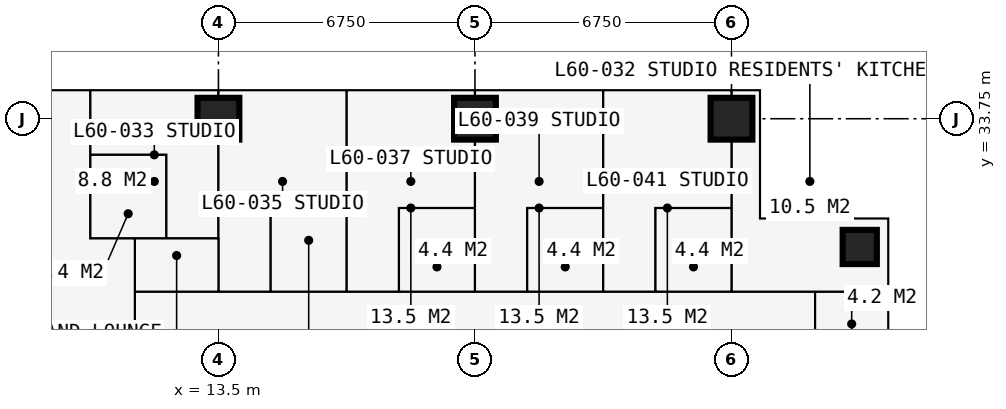
"""IFC4 building model, lengths in metres.
Left out: names, types, materials, properties, quantities, classifications, styles, units other than length and angle.
Written with IfcOpenShell. Run it as: python <this file> out.ifc"""

import sys

from ifc_helpers import new_model, si_unit, direction, frame, frame_2d, origin, origin_2d, place, context, subcontext, project, spatial, rectangle, extrude, element, fill, save


model = new_model("IFC4")
c1 = context("Model", 3, precision=1e-05, world=origin(), true_north=direction((0.0, 1.0)))
c2 = subcontext(c1, "Body", "Model", "MODEL_VIEW")
j1 = project(units=[si_unit("LENGTHUNIT", "METRE"), si_unit("PLANEANGLEUNIT", "RADIAN")], contexts=[c1])
p1 = place(None, origin())
s1 = spatial("IfcSite", under=j1, at=p1, CompositionType="ELEMENT")
p2 = place(p1, origin())
s2 = spatial("IfcBuilding", under=s1, at=p2, CompositionType="ELEMENT")
p3 = place(p2, frame((0.0, 0.0, 222.3)))
s3 = spatial("IfcBuildingStorey", under=s2, at=p3, CompositionType="ELEMENT", Elevation=222.3)
for number, where, z_axis, x_axis in (
    (1, (13.5, 33.75, 0.0), (0.0, 0.0, 1.0), (1.0, 0.0, 0.0)),
    (2, (20.25, 33.75, 0.0), (0.0, 0.0, 1.0), (1.0, 0.0, 0.0)),
    (3, (27.0, 33.75, 0.0), (0.0, 0.0, 1.0), (1.0, 0.0, 0.0)),
):
    element("IfcColumn", number, at=place(p3, frame(where, z_axis=z_axis, x_axis=x_axis)), inside=s3, PredefinedType="COLUMN", context=c2, shape_type="SweptSolid", body=[
        extrude(rectangle(XDim=1.1, YDim=1.1, at=origin_2d()), origin(), (0.0, 0.0, 1.0), 3.6),
    ])
p4 = place(p3, frame((30.375, 30.375, 0.0), z_axis=(0.0, 0.0, 1.0), x_axis=(1.0, 0.0, 0.0)))
e4 = element("IfcColumn", 4, at=p4, inside=s3, PredefinedType="COLUMN", context=c2, shape_type="SweptSolid", body=[
    extrude(rectangle(XDim=0.9, YDim=0.9, at=origin_2d()), origin(), (0.0, 0.0, 1.0), 3.6),
])
p5 = place(p3, frame((31.125, 27.75, 0.0), z_axis=(0.0, 0.0, 1.0), x_axis=(0.0, 1.0, 0.0)))
e5 = element("IfcWall", 5, at=p5, inside=s3, PredefinedType="SOLIDWALL", context=c2, shape_type="SweptSolid", body=[
    extrude(rectangle(XDim=3.375, YDim=0.3, at=frame_2d((1.688, 0.0))), origin(), (0.0, 0.0, 1.0), 3.375),
])
p6 = place(p5, frame((1.663, 0.0, 0.9)))
e6 = element("IfcOpeningElement", 6, at=p6, cuts=e5, PredefinedType="OPENING", context=c2, shape_type="SweptSolid", body=[
    extrude(rectangle(XDim=1.5, YDim=1.8, at=frame_2d((0.75, 0.9))), frame((0.0, 0.16, 0.0), z_axis=(0.0, -1.0, 0.0), x_axis=(1.0, 0.0, 0.0)), (0.0, 0.0, 1.0), 0.32),
])
p7 = place(p3, frame((31.125, 31.125, 0.0), z_axis=(0.0, 0.0, 1.0), x_axis=(-1.0, 0.0, 0.0)))
e7 = element("IfcWall", 7, at=p7, inside=s3, PredefinedType="SOLIDWALL", context=c2, shape_type="SweptSolid", body=[
    extrude(rectangle(XDim=3.375, YDim=0.3, at=frame_2d((1.688, 0.0))), origin(), (0.0, 0.0, 1.0), 3.375),
])
p8 = place(p7, frame((0.788, 0.0, 0.6)))
e8 = element("IfcOpeningElement", 8, at=p8, cuts=e7, PredefinedType="OPENING", context=c2, shape_type="SweptSolid", body=[
    extrude(rectangle(XDim=1.8, YDim=2.1, at=frame_2d((0.9, 1.05))), frame((0.0, 0.16, 0.0), z_axis=(0.0, -1.0, 0.0), x_axis=(1.0, 0.0, 0.0)), (0.0, 0.0, 1.0), 0.32),
])
p9 = place(p3, frame((27.75, 31.125, 0.0), z_axis=(0.0, 0.0, 1.0), x_axis=(0.0, 1.0, 0.0)))
e9 = element("IfcWall", 9, at=p9, inside=s3, PredefinedType="SOLIDWALL", context=c2, shape_type="SweptSolid", body=[
    extrude(rectangle(XDim=3.375, YDim=0.3, at=frame_2d((1.688, 0.0))), origin(), (0.0, 0.0, 1.0), 3.375),
])
p10 = place(p9, frame((0.788, 0.0, 0.6)))
e10 = element("IfcOpeningElement", 10, at=p10, cuts=e9, PredefinedType="OPENING", context=c2, shape_type="SweptSolid", body=[
    extrude(rectangle(XDim=1.8, YDim=2.1, at=frame_2d((0.9, 1.05))), frame((0.0, 0.16, 0.0), z_axis=(0.0, -1.0, 0.0), x_axis=(1.0, 0.0, 0.0)), (0.0, 0.0, 1.0), 0.32),
])
p11 = place(p3, frame((10.125, 30.6, 0.0), z_axis=(0.0, 0.0, 1.0), x_axis=(0.0, 1.0, 0.0)))
e11 = element("IfcWall", 11, at=p11, inside=s3, PredefinedType="PARTITIONING", context=c2, shape_type="SweptSolid", body=[
    extrude(rectangle(XDim=3.884, YDim=0.1, at=frame_2d((1.942, 0.0))), origin(), (0.0, 0.0, 1.0), 3.375),
])
p12 = place(p3, frame((10.125, 30.6, 0.0), z_axis=(0.0, 0.0, 1.0), x_axis=(1.0, 0.0, 0.0)))
e12 = element("IfcWall", 12, at=p12, inside=s3, PredefinedType="PARTITIONING", context=c2, shape_type="SweptSolid", body=[
    extrude(rectangle(XDim=3.375, YDim=0.1, at=frame_2d((1.688, 0.0))), origin(), (0.0, 0.0, 1.0), 3.375),
])
p13 = place(p12, frame((2.2, 0.0, 0.0)))
e13 = element("IfcOpeningElement", 13, at=p13, cuts=e12, PredefinedType="OPENING", context=c2, shape_type="SweptSolid", body=[
    extrude(rectangle(XDim=0.95, YDim=2.2, at=frame_2d((0.475, 1.1))), frame((0.0, 0.06, 0.0), z_axis=(0.0, -1.0, 0.0), x_axis=(1.0, 0.0, 0.0)), (0.0, 0.0, 1.0), 0.12),
])
p14 = place(p3, frame((10.125, 32.8, 0.0), z_axis=(0.0, 0.0, 1.0), x_axis=(1.0, 0.0, 0.0)))
e14 = element("IfcWall", 14, at=p14, inside=s3, PredefinedType="PARTITIONING", context=c2, shape_type="SweptSolid", body=[
    extrude(rectangle(XDim=2.0, YDim=0.1, at=frame_2d((1.0, 0.0))), origin(), (0.0, 0.0, 1.0), 3.375),
])
p15 = place(p3, frame((11.3, 11.3, 0.0), z_axis=(0.0, 0.0, 1.0), x_axis=(0.0, 1.0, 0.0)))
e15 = element("IfcWall", 15, at=p15, inside=s3, PredefinedType="PARTITIONING", context=c2, shape_type="SweptSolid", body=[
    extrude(rectangle(XDim=19.3, YDim=0.15, at=frame_2d((9.65, 0.0))), origin(), (0.0, 0.0, 1.0), 3.375),
])
p16 = place(p15, frame((18.1, 0.0, 0.0)))
e16 = element("IfcOpeningElement", 16, at=p16, cuts=e15, PredefinedType="OPENING", context=c2, shape_type="SweptSolid", body=[
    extrude(rectangle(XDim=1.0, YDim=2.2, at=frame_2d((0.5, 1.1))), frame((0.0, 0.085, 0.0), z_axis=(0.0, -1.0, 0.0), x_axis=(1.0, 0.0, 0.0)), (0.0, 0.0, 1.0), 0.17),
])
p17 = place(p15, frame((12.137, 0.0, 0.0)))
e17 = element("IfcOpeningElement", 17, at=p17, cuts=e15, PredefinedType="OPENING", context=c2, shape_type="SweptSolid", body=[
    extrude(rectangle(XDim=1.0, YDim=2.2, at=frame_2d((0.5, 1.1))), frame((0.0, 0.085, 0.0), z_axis=(0.0, -1.0, 0.0), x_axis=(1.0, 0.0, 0.0)), (0.0, 0.0, 1.0), 0.17),
])
p18 = place(p3, frame((11.3, 29.2, 0.0), z_axis=(0.0, 0.0, 1.0), x_axis=(1.0, 0.0, 0.0)))
e18 = element("IfcWall", 18, at=p18, inside=s3, PredefinedType="PARTITIONING", context=c2, shape_type="SweptSolid", body=[
    extrude(rectangle(XDim=19.809, YDim=0.15, at=frame_2d((9.904, 0.0))), origin(), (0.0, 0.0, 1.0), 3.375),
])
p19 = place(p18, frame((16.3, 0.0, 0.0)))
e19 = element("IfcOpeningElement", 19, at=p19, cuts=e18, PredefinedType="OPENING", context=c2, shape_type="SweptSolid", body=[
    extrude(rectangle(XDim=1.0, YDim=2.2, at=frame_2d((0.5, 1.1))), frame((0.0, 0.085, 0.0), z_axis=(0.0, -1.0, 0.0), x_axis=(1.0, 0.0, 0.0)), (0.0, 0.0, 1.0), 0.17),
])
p20 = place(p18, frame((5.825, 0.0, 0.0)))
e20 = element("IfcOpeningElement", 20, at=p20, cuts=e18, PredefinedType="OPENING", context=c2, shape_type="SweptSolid", body=[
    extrude(rectangle(XDim=0.95, YDim=2.2, at=frame_2d((0.475, 1.1))), frame((0.0, 0.085, 0.0), z_axis=(0.0, -1.0, 0.0), x_axis=(1.0, 0.0, 0.0)), (0.0, 0.0, 1.0), 0.17),
])
p21 = place(p18, frame((9.2, 0.0, 0.0)))
e21 = element("IfcOpeningElement", 21, at=p21, cuts=e18, PredefinedType="OPENING", context=c2, shape_type="SweptSolid", body=[
    extrude(rectangle(XDim=0.95, YDim=2.2, at=frame_2d((0.475, 1.1))), frame((0.0, 0.085, 0.0), z_axis=(0.0, -1.0, 0.0), x_axis=(1.0, 0.0, 0.0)), (0.0, 0.0, 1.0), 0.17),
])
p22 = place(p18, frame((12.575, 0.0, 0.0)))
e22 = element("IfcOpeningElement", 22, at=p22, cuts=e18, PredefinedType="OPENING", context=c2, shape_type="SweptSolid", body=[
    extrude(rectangle(XDim=0.95, YDim=2.2, at=frame_2d((0.475, 1.1))), frame((0.0, 0.085, 0.0), z_axis=(0.0, -1.0, 0.0), x_axis=(1.0, 0.0, 0.0)), (0.0, 0.0, 1.0), 0.17),
])
p23 = place(p18, frame((0.6, 0.0, 0.0)))
e23 = element("IfcOpeningElement", 23, at=p23, cuts=e18, PredefinedType="OPENING", context=c2, shape_type="SweptSolid", body=[
    extrude(rectangle(XDim=1.0, YDim=2.2, at=frame_2d((0.5, 1.1))), frame((0.0, 0.085, 0.0), z_axis=(0.0, -1.0, 0.0), x_axis=(1.0, 0.0, 0.0)), (0.0, 0.0, 1.0), 0.17),
])
p24 = place(p3, frame((12.125, 30.6, 0.0), z_axis=(0.0, 0.0, 1.0), x_axis=(0.0, 1.0, 0.0)))
e24 = element("IfcWall", 24, at=p24, inside=s3, PredefinedType="PARTITIONING", context=c2, shape_type="SweptSolid", body=[
    extrude(rectangle(XDim=2.2, YDim=0.1, at=frame_2d((1.1, 0.0))), origin(), (0.0, 0.0, 1.0), 3.375),
])
p25 = place(p24, frame((0.65, 0.0, 0.0)))
e25 = element("IfcOpeningElement", 25, at=p25, cuts=e24, PredefinedType="OPENING", context=c2, shape_type="SweptSolid", body=[
    extrude(rectangle(XDim=0.9, YDim=2.2, at=frame_2d((0.45, 1.1))), frame((0.0, 0.06, 0.0), z_axis=(0.0, -1.0, 0.0), x_axis=(1.0, 0.0, 0.0)), (0.0, 0.0, 1.0), 0.12),
])
p26 = place(p3, frame((13.5, 29.2, 0.0), z_axis=(0.0, 0.0, 1.0), x_axis=(0.0, 1.0, 0.0)))
e26 = element("IfcWall", 26, at=p26, inside=s3, PredefinedType="PARTITIONING", context=c2, shape_type="SweptSolid", body=[
    extrude(rectangle(XDim=5.284, YDim=0.175, at=frame_2d((2.642, 0.0))), origin(), (0.0, 0.0, 1.0), 2.61),
])
p27 = place(p26, frame((0.25, 0.0, 0.0)))
e27 = element("IfcOpeningElement", 27, at=p27, cuts=e26, PredefinedType="OPENING", context=c2, shape_type="SweptSolid", body=[
    extrude(rectangle(XDim=0.95, YDim=2.2, at=frame_2d((0.475, 1.1))), frame((0.0, 0.097, 0.0), z_axis=(0.0, -1.0, 0.0), x_axis=(1.0, 0.0, 0.0)), (0.0, 0.0, 1.0), 0.195),
])
p28 = place(p3, frame((14.875, 29.2, 0.0), z_axis=(0.0, 0.0, 1.0), x_axis=(0.0, 1.0, 0.0)))
e28 = element("IfcWall", 28, at=p28, inside=s3, PredefinedType="PARTITIONING", context=c2, shape_type="SweptSolid", body=[
    extrude(rectangle(XDim=2.2, YDim=0.1, at=frame_2d((1.1, 0.0))), origin(), (0.0, 0.0, 1.0), 3.375),
])
p29 = place(p28, frame((0.65, 0.0, 0.0)))
e29 = element("IfcOpeningElement", 29, at=p29, cuts=e28, PredefinedType="OPENING", context=c2, shape_type="SweptSolid", body=[
    extrude(rectangle(XDim=0.9, YDim=2.2, at=frame_2d((0.45, 1.1))), frame((0.0, 0.06, 0.0), z_axis=(0.0, -1.0, 0.0), x_axis=(1.0, 0.0, 0.0)), (0.0, 0.0, 1.0), 0.12),
])
p30 = place(p3, frame((14.875, 31.4, 0.0), z_axis=(0.0, 0.0, 1.0), x_axis=(1.0, 0.0, 0.0)))
e30 = element("IfcWall", 30, at=p30, inside=s3, PredefinedType="PARTITIONING", context=c2, shape_type="SweptSolid", body=[
    extrude(rectangle(XDim=2.0, YDim=0.1, at=frame_2d((1.0, 0.0))), origin(), (0.0, 0.0, 1.0), 3.375),
])
p31 = place(p3, frame((16.875, 29.2, 0.0), z_axis=(0.0, 0.0, 1.0), x_axis=(0.0, 1.0, 0.0)))
e31 = element("IfcWall", 31, at=p31, inside=s3, PredefinedType="PARTITIONING", context=c2, shape_type="SweptSolid", body=[
    extrude(rectangle(XDim=5.284, YDim=0.175, at=frame_2d((2.642, 0.0))), origin(), (0.0, 0.0, 1.0), 3.375),
])
p32 = place(p3, frame((18.25, 29.2, 0.0), z_axis=(0.0, 0.0, 1.0), x_axis=(0.0, 1.0, 0.0)))
e32 = element("IfcWall", 32, at=p32, inside=s3, PredefinedType="PARTITIONING", context=c2, shape_type="SweptSolid", body=[
    extrude(rectangle(XDim=2.2, YDim=0.1, at=frame_2d((1.1, 0.0))), origin(), (0.0, 0.0, 1.0), 3.375),
])
p33 = place(p32, frame((0.65, 0.0, 0.0)))
e33 = element("IfcOpeningElement", 33, at=p33, cuts=e32, PredefinedType="OPENING", context=c2, shape_type="SweptSolid", body=[
    extrude(rectangle(XDim=0.9, YDim=2.2, at=frame_2d((0.45, 1.1))), frame((0.0, 0.06, 0.0), z_axis=(0.0, -1.0, 0.0), x_axis=(1.0, 0.0, 0.0)), (0.0, 0.0, 1.0), 0.12),
])
p34 = place(p3, frame((18.25, 31.4, 0.0), z_axis=(0.0, 0.0, 1.0), x_axis=(1.0, 0.0, 0.0)))
e34 = element("IfcWall", 34, at=p34, inside=s3, PredefinedType="PARTITIONING", context=c2, shape_type="SweptSolid", body=[
    extrude(rectangle(XDim=2.0, YDim=0.1, at=frame_2d((1.0, 0.0))), origin(), (0.0, 0.0, 1.0), 3.375),
])
p35 = place(p3, frame((20.25, 29.2, 0.0), z_axis=(0.0, 0.0, 1.0), x_axis=(0.0, 1.0, 0.0)))
e35 = element("IfcWall", 35, at=p35, inside=s3, PredefinedType="PARTITIONING", context=c2, shape_type="SweptSolid", body=[
    extrude(rectangle(XDim=5.284, YDim=0.175, at=frame_2d((2.642, 0.0))), origin(), (0.0, 0.0, 1.0), 2.61),
])
p36 = place(p3, frame((21.625, 29.2, 0.0), z_axis=(0.0, 0.0, 1.0), x_axis=(0.0, 1.0, 0.0)))
e36 = element("IfcWall", 36, at=p36, inside=s3, PredefinedType="PARTITIONING", context=c2, shape_type="SweptSolid", body=[
    extrude(rectangle(XDim=2.2, YDim=0.1, at=frame_2d((1.1, 0.0))), origin(), (0.0, 0.0, 1.0), 3.375),
])
p37 = place(p36, frame((0.65, 0.0, 0.0)))
e37 = element("IfcOpeningElement", 37, at=p37, cuts=e36, PredefinedType="OPENING", context=c2, shape_type="SweptSolid", body=[
    extrude(rectangle(XDim=0.9, YDim=2.2, at=frame_2d((0.45, 1.1))), frame((0.0, 0.06, 0.0), z_axis=(0.0, -1.0, 0.0), x_axis=(1.0, 0.0, 0.0)), (0.0, 0.0, 1.0), 0.12),
])
p38 = place(p3, frame((21.625, 31.4, 0.0), z_axis=(0.0, 0.0, 1.0), x_axis=(1.0, 0.0, 0.0)))
e38 = element("IfcWall", 38, at=p38, inside=s3, PredefinedType="PARTITIONING", context=c2, shape_type="SweptSolid", body=[
    extrude(rectangle(XDim=2.0, YDim=0.1, at=frame_2d((1.0, 0.0))), origin(), (0.0, 0.0, 1.0), 3.375),
])
p39 = place(p3, frame((23.625, 29.2, 0.0), z_axis=(0.0, 0.0, 1.0), x_axis=(0.0, 1.0, 0.0)))
e39 = element("IfcWall", 39, at=p39, inside=s3, PredefinedType="PARTITIONING", context=c2, shape_type="SweptSolid", body=[
    extrude(rectangle(XDim=5.284, YDim=0.175, at=frame_2d((2.642, 0.0))), origin(), (0.0, 0.0, 1.0), 3.375),
])
p40 = place(p3, frame((25.0, 29.2, 0.0), z_axis=(0.0, 0.0, 1.0), x_axis=(0.0, 1.0, 0.0)))
e40 = element("IfcWall", 40, at=p40, inside=s3, PredefinedType="PARTITIONING", context=c2, shape_type="SweptSolid", body=[
    extrude(rectangle(XDim=2.2, YDim=0.1, at=frame_2d((1.1, 0.0))), origin(), (0.0, 0.0, 1.0), 3.375),
])
p41 = place(p40, frame((0.65, 0.0, 0.0)))
e41 = element("IfcOpeningElement", 41, at=p41, cuts=e40, PredefinedType="OPENING", context=c2, shape_type="SweptSolid", body=[
    extrude(rectangle(XDim=0.9, YDim=2.2, at=frame_2d((0.45, 1.1))), frame((0.0, 0.06, 0.0), z_axis=(0.0, -1.0, 0.0), x_axis=(1.0, 0.0, 0.0)), (0.0, 0.0, 1.0), 0.12),
])
p42 = place(p3, frame((25.0, 31.4, 0.0), z_axis=(0.0, 0.0, 1.0), x_axis=(1.0, 0.0, 0.0)))
e42 = element("IfcWall", 42, at=p42, inside=s3, PredefinedType="PARTITIONING", context=c2, shape_type="SweptSolid", body=[
    extrude(rectangle(XDim=2.0, YDim=0.1, at=frame_2d((1.0, 0.0))), origin(), (0.0, 0.0, 1.0), 3.375),
])
p43 = place(p3, frame((27.0, 29.2, 0.0), z_axis=(0.0, 0.0, 1.0), x_axis=(0.0, 1.0, 0.0)))
e43 = element("IfcWall", 43, at=p43, inside=s3, PredefinedType="PARTITIONING", context=c2, shape_type="SweptSolid", body=[
    extrude(rectangle(XDim=5.284, YDim=0.15, at=frame_2d((2.642, 0.0))), origin(), (0.0, 0.0, 1.0), 2.877),
])
p44 = place(p3, frame((29.2, 11.3, 0.0), z_axis=(0.0, 0.0, 1.0), x_axis=(0.0, 1.0, 0.0)))
e44 = element("IfcWall", 44, at=p44, inside=s3, PredefinedType="PARTITIONING", context=c2, shape_type="SweptSolid", body=[
    extrude(rectangle(XDim=17.9, YDim=0.2, at=frame_2d((8.95, 0.0))), origin(), (0.0, 0.0, 1.0), 3.375),
])
p45 = place(p44, frame((0.6, 0.0, 0.0)))
e45 = element("IfcOpeningElement", 45, at=p45, cuts=e44, PredefinedType="OPENING", context=c2, shape_type="SweptSolid", body=[
    extrude(rectangle(XDim=1.0, YDim=2.2, at=frame_2d((0.5, 1.1))), frame((0.0, 0.11, 0.0), z_axis=(0.0, -1.0, 0.0), x_axis=(1.0, 0.0, 0.0)), (0.0, 0.0, 1.0), 0.22),
])
p46 = place(p44, frame((10.55, 0.0, 0.0)))
e46 = element("IfcOpeningElement", 46, at=p46, cuts=e44, PredefinedType="OPENING", context=c2, shape_type="SweptSolid", body=[
    extrude(rectangle(XDim=0.95, YDim=2.2, at=frame_2d((0.475, 1.1))), frame((0.0, 0.11, 0.0), z_axis=(0.0, -1.0, 0.0), x_axis=(1.0, 0.0, 0.0)), (0.0, 0.0, 1.0), 0.22),
])
p47 = place(p44, frame((3.8, 0.0, 0.0)))
e47 = element("IfcOpeningElement", 47, at=p47, cuts=e44, PredefinedType="OPENING", context=c2, shape_type="SweptSolid", body=[
    extrude(rectangle(XDim=0.95, YDim=2.2, at=frame_2d((0.475, 1.1))), frame((0.0, 0.11, 0.0), z_axis=(0.0, -1.0, 0.0), x_axis=(1.0, 0.0, 0.0)), (0.0, 0.0, 1.0), 0.22),
])
p48 = place(p44, frame((16.3, 0.0, 0.0)))
e48 = element("IfcOpeningElement", 48, at=p48, cuts=e44, PredefinedType="OPENING", context=c2, shape_type="SweptSolid", body=[
    extrude(rectangle(XDim=1.0, YDim=2.2, at=frame_2d((0.5, 1.1))), frame((0.0, 0.11, 0.0), z_axis=(0.0, -1.0, 0.0), x_axis=(1.0, 0.0, 0.0)), (0.0, 0.0, 1.0), 0.22),
])
p49 = place(p6, origin())
e49 = element("IfcWindow", 49, at=p49, inside=s3, PartitioningType="SINGLE_PANEL", PredefinedType="WINDOW", context=c2, shape_type="SweptSolid", body=[
    extrude(rectangle(XDim=1.5, YDim=1.8, at=frame_2d((0.75, 0.9))), frame((0.0, 0.03, 0.0), z_axis=(0.0, -1.0, 0.0), x_axis=(1.0, 0.0, 0.0)), (0.0, 0.0, 1.0), 0.06),
])
fill(e6, e49)
p50 = place(p8, origin())
e50 = element("IfcWindow", 50, at=p50, inside=s3, PartitioningType="SINGLE_PANEL", PredefinedType="WINDOW", context=c2, shape_type="SweptSolid", body=[
    extrude(rectangle(XDim=1.8, YDim=2.1, at=frame_2d((0.9, 1.05))), frame((0.0, 0.03, 0.0), z_axis=(0.0, -1.0, 0.0), x_axis=(1.0, 0.0, 0.0)), (0.0, 0.0, 1.0), 0.06),
])
fill(e8, e50)
p51 = place(p10, origin())
e51 = element("IfcWindow", 51, at=p51, inside=s3, PartitioningType="SINGLE_PANEL", PredefinedType="WINDOW", context=c2, shape_type="SweptSolid", body=[
    extrude(rectangle(XDim=1.8, YDim=2.1, at=frame_2d((0.9, 1.05))), frame((0.0, 0.03, 0.0), z_axis=(0.0, -1.0, 0.0), x_axis=(1.0, 0.0, 0.0)), (0.0, 0.0, 1.0), 0.06),
])
fill(e10, e51)
p52 = place(p48, origin())
e52 = element("IfcDoor", 52, at=p52, inside=s3, OperationType="SINGLE_SWING_LEFT", PredefinedType="DOOR", context=c2, shape_type="SweptSolid", body=[
    extrude(rectangle(XDim=1.0, YDim=2.2, at=frame_2d((0.5, 1.1))), frame((0.0, 0.025, 0.0), z_axis=(0.0, -1.0, 0.0), x_axis=(1.0, 0.0, 0.0)), (0.0, 0.0, 1.0), 0.05),
])
fill(e48, e52)
p53 = place(p19, origin())
e53 = element("IfcDoor", 53, at=p53, inside=s3, OperationType="SINGLE_SWING_LEFT", PredefinedType="DOOR", context=c2, shape_type="SweptSolid", body=[
    extrude(rectangle(XDim=1.0, YDim=2.2, at=frame_2d((0.5, 1.1))), frame((0.0, 0.025, 0.0), z_axis=(0.0, -1.0, 0.0), x_axis=(1.0, 0.0, 0.0)), (0.0, 0.0, 1.0), 0.05),
])
fill(e19, e53)
p54 = place(p13, origin())
e54 = element("IfcDoor", 54, at=p54, inside=s3, OperationType="SINGLE_SWING_LEFT", PredefinedType="DOOR", context=c2, shape_type="SweptSolid", body=[
    extrude(rectangle(XDim=0.95, YDim=2.2, at=frame_2d((0.475, 1.1))), frame((0.0, 0.025, 0.0), z_axis=(0.0, -1.0, 0.0), x_axis=(1.0, 0.0, 0.0)), (0.0, 0.0, 1.0), 0.05),
])
fill(e13, e54)
p55 = place(p25, origin())
e55 = element("IfcDoor", 55, at=p55, inside=s3, OperationType="SINGLE_SWING_RIGHT", PredefinedType="DOOR", context=c2, shape_type="SweptSolid", body=[
    extrude(rectangle(XDim=0.9, YDim=2.2, at=frame_2d((0.45, 1.1))), frame((0.0, 0.025, 0.0), z_axis=(0.0, -1.0, 0.0), x_axis=(1.0, 0.0, 0.0)), (0.0, 0.0, 1.0), 0.05),
])
fill(e25, e55)
p56 = place(p27, origin())
e56 = element("IfcDoor", 56, at=p56, inside=s3, OperationType="SINGLE_SWING_LEFT", PredefinedType="DOOR", context=c2, shape_type="SweptSolid", body=[
    extrude(rectangle(XDim=0.95, YDim=2.2, at=frame_2d((0.475, 1.1))), frame((0.0, 0.025, 0.0), z_axis=(0.0, -1.0, 0.0), x_axis=(1.0, 0.0, 0.0)), (0.0, 0.0, 1.0), 0.05),
])
fill(e27, e56)
p57 = place(p29, origin())
e57 = element("IfcDoor", 57, at=p57, inside=s3, OperationType="SINGLE_SWING_RIGHT", PredefinedType="DOOR", context=c2, shape_type="SweptSolid", body=[
    extrude(rectangle(XDim=0.9, YDim=2.2, at=frame_2d((0.45, 1.1))), frame((0.0, 0.025, 0.0), z_axis=(0.0, -1.0, 0.0), x_axis=(1.0, 0.0, 0.0)), (0.0, 0.0, 1.0), 0.05),
])
fill(e29, e57)
p58 = place(p20, origin())
e58 = element("IfcDoor", 58, at=p58, inside=s3, OperationType="SINGLE_SWING_LEFT", PredefinedType="DOOR", context=c2, shape_type="SweptSolid", body=[
    extrude(rectangle(XDim=0.95, YDim=2.2, at=frame_2d((0.475, 1.1))), frame((0.0, 0.025, 0.0), z_axis=(0.0, -1.0, 0.0), x_axis=(1.0, 0.0, 0.0)), (0.0, 0.0, 1.0), 0.05),
])
fill(e20, e58)
p59 = place(p33, origin())
e59 = element("IfcDoor", 59, at=p59, inside=s3, OperationType="SINGLE_SWING_RIGHT", PredefinedType="DOOR", context=c2, shape_type="SweptSolid", body=[
    extrude(rectangle(XDim=0.9, YDim=2.2, at=frame_2d((0.45, 1.1))), frame((0.0, 0.025, 0.0), z_axis=(0.0, -1.0, 0.0), x_axis=(1.0, 0.0, 0.0)), (0.0, 0.0, 1.0), 0.05),
])
fill(e33, e59)
p60 = place(p21, origin())
e60 = element("IfcDoor", 60, at=p60, inside=s3, OperationType="SINGLE_SWING_LEFT", PredefinedType="DOOR", context=c2, shape_type="SweptSolid", body=[
    extrude(rectangle(XDim=0.95, YDim=2.2, at=frame_2d((0.475, 1.1))), frame((0.0, 0.025, 0.0), z_axis=(0.0, -1.0, 0.0), x_axis=(1.0, 0.0, 0.0)), (0.0, 0.0, 1.0), 0.05),
])
fill(e21, e60)
p61 = place(p37, origin())
e61 = element("IfcDoor", 61, at=p61, inside=s3, OperationType="SINGLE_SWING_RIGHT", PredefinedType="DOOR", context=c2, shape_type="SweptSolid", body=[
    extrude(rectangle(XDim=0.9, YDim=2.2, at=frame_2d((0.45, 1.1))), frame((0.0, 0.025, 0.0), z_axis=(0.0, -1.0, 0.0), x_axis=(1.0, 0.0, 0.0)), (0.0, 0.0, 1.0), 0.05),
])
fill(e37, e61)
p62 = place(p22, origin())
e62 = element("IfcDoor", 62, at=p62, inside=s3, OperationType="SINGLE_SWING_LEFT", PredefinedType="DOOR", context=c2, shape_type="SweptSolid", body=[
    extrude(rectangle(XDim=0.95, YDim=2.2, at=frame_2d((0.475, 1.1))), frame((0.0, 0.025, 0.0), z_axis=(0.0, -1.0, 0.0), x_axis=(1.0, 0.0, 0.0)), (0.0, 0.0, 1.0), 0.05),
])
fill(e22, e62)
p63 = place(p41, origin())
e63 = element("IfcDoor", 63, at=p63, inside=s3, OperationType="SINGLE_SWING_RIGHT", PredefinedType="DOOR", context=c2, shape_type="SweptSolid", body=[
    extrude(rectangle(XDim=0.9, YDim=2.2, at=frame_2d((0.45, 1.1))), frame((0.0, 0.025, 0.0), z_axis=(0.0, -1.0, 0.0), x_axis=(1.0, 0.0, 0.0)), (0.0, 0.0, 1.0), 0.05),
])
fill(e41, e63)
p64 = place(p23, origin())
e64 = element("IfcDoor", 64, at=p64, inside=s3, OperationType="SINGLE_SWING_LEFT", PredefinedType="DOOR", context=c2, shape_type="SweptSolid", body=[
    extrude(rectangle(XDim=1.0, YDim=2.2, at=frame_2d((0.5, 1.1))), frame((0.0, 0.025, 0.0), z_axis=(0.0, -1.0, 0.0), x_axis=(1.0, 0.0, 0.0)), (0.0, 0.0, 1.0), 0.05),
])
fill(e23, e64)
p65 = place(p16, origin())
e65 = element("IfcDoor", 65, at=p65, inside=s3, OperationType="SINGLE_SWING_LEFT", PredefinedType="DOOR", context=c2, shape_type="SweptSolid", body=[
    extrude(rectangle(XDim=1.0, YDim=2.2, at=frame_2d((0.5, 1.1))), frame((0.0, 0.025, 0.0), z_axis=(0.0, -1.0, 0.0), x_axis=(1.0, 0.0, 0.0)), (0.0, 0.0, 1.0), 0.05),
])
fill(e16, e65)
save(model, sys.argv[1])
